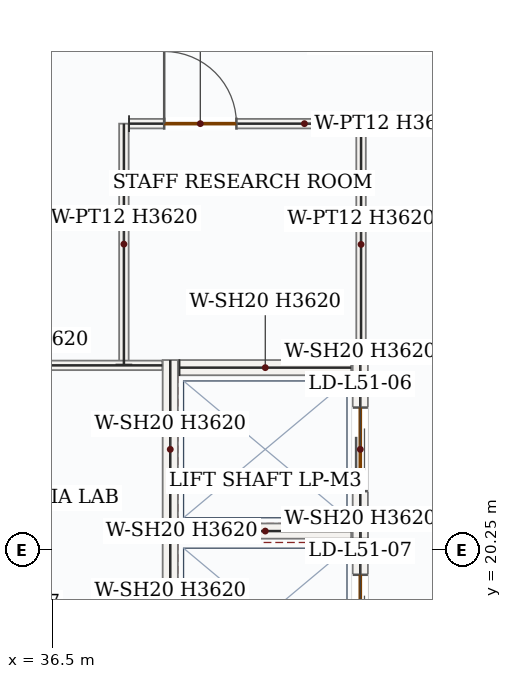
"""IFC4 building model, lengths in metres.
Left out: names, types, materials, properties, quantities, classifications, styles, units other than length and angle.
Written with IfcOpenShell. Run it as: python <this file> out.ifc"""

import sys

from ifc_helpers import new_model, si_unit, direction, frame, frame_2d, origin, place, context, subcontext, project, spatial, rectangle, extrude, source, transform, mapped, element, fill, save


model = new_model("IFC4")
c1 = context("Model", 3, precision=1e-05, world=origin(), true_north=direction((0.0, 1.0)))
c2 = subcontext(c1, "Body", "Model", "MODEL_VIEW")
j1 = project(units=[si_unit("LENGTHUNIT", "METRE"), si_unit("PLANEANGLEUNIT", "RADIAN")], contexts=[c1])
p1 = place(None, origin())
s1 = spatial("IfcSite", under=j1, at=p1, CompositionType="ELEMENT")
p2 = place(p1, origin())
s2 = spatial("IfcBuilding", under=s1, at=p2, CompositionType="ELEMENT")
p3 = place(p2, frame((0.0, 0.0, 217.5)))
s3 = spatial("IfcBuildingStorey", under=s2, at=p3, CompositionType="ELEMENT", Elevation=217.5)
m1 = source(origin(), c2, "Body", "SweptSolid", [
    extrude(rectangle(XDim=2.35, YDim=0.2, at=frame_2d((1.175, 0.0))), origin(), (0.0, 0.0, 1.0), 3.62),
])
p4 = place(p3, frame((38.05, 20.4, 0.0), z_axis=(0.0, 0.0, 1.0), x_axis=(0.0, 1.0, 0.0)))
e1 = element("IfcWall", 1, at=p4, inside=s3, PredefinedType="SOLIDWALL", context=c2, shape_type="MappedRepresentation", body=[
    mapped(m1, transform((0.0, 0.0, 0.0), x_axis=(1.0, 0.0, 0.0), y_axis=(0.0, 1.0, 0.0), z_axis=(0.0, 0.0, 1.0), scale=1.0)),
])
p5 = place(p3, frame((40.55, 20.4, 0.0), z_axis=(0.0, 0.0, 1.0), x_axis=(0.0, 1.0, 0.0)))
e2 = element("IfcWall", 2, at=p5, inside=s3, PredefinedType="SOLIDWALL", context=c2, shape_type="SweptSolid", body=[
    extrude(rectangle(XDim=2.35, YDim=0.2, at=frame_2d((1.175, 0.0))), origin(), (0.0, 0.0, 1.0), 3.62),
])
p6 = place(p5, frame((0.625, 0.0, 0.0)))
e3 = element("IfcOpeningElement", 3, at=p6, cuts=e2, PredefinedType="OPENING", context=c2, shape_type="SweptSolid", body=[
    extrude(rectangle(XDim=1.1, YDim=2.15, at=frame_2d((0.55, 1.075))), frame((0.0, 0.11, 0.0), z_axis=(0.0, -1.0, 0.0), x_axis=(1.0, 0.0, 0.0)), (0.0, 0.0, 1.0), 0.22),
])
m2 = source(origin(), c2, "Body", "SweptSolid", [
    extrude(rectangle(XDim=2.26, YDim=0.2, at=frame_2d((1.13, 0.0))), origin(), (0.0, 0.0, 1.0), 3.62),
])
for number, where, z_axis, x_axis in (
    (4, (38.17, 20.5, 0.0), (0.0, 0.0, 1.0), (1.0, 0.0, 0.0)),
    (5, (38.17, 22.65, 0.0), (0.0, 0.0, 1.0), (1.0, 0.0, 0.0)),
):
    element("IfcWall", number, at=place(p3, frame(where, z_axis=z_axis, x_axis=x_axis)), inside=s3, PredefinedType="SOLIDWALL", context=c2, shape_type="MappedRepresentation", body=[
        mapped(m2, transform((0.0, 0.0, 0.0), x_axis=(1.0, 0.0, 0.0), y_axis=(0.0, 1.0, 0.0), z_axis=(0.0, 0.0, 1.0), scale=1.0)),
    ])
p7 = place(p3, frame((38.05, 18.2, 0.0), z_axis=(0.0, 0.0, 1.0), x_axis=(0.0, 1.0, 0.0)))
e6 = element("IfcWall", 6, at=p7, inside=s3, PredefinedType="SOLIDWALL", context=c2, shape_type="MappedRepresentation", body=[
    mapped(m1, transform((0.0, 0.0, 0.0), x_axis=(1.0, 0.0, 0.0), y_axis=(0.0, 1.0, 0.0), z_axis=(0.0, 0.0, 1.0), scale=1.0)),
])
p8 = place(p3, frame((40.55, 18.2, 0.0), z_axis=(0.0, 0.0, 1.0), x_axis=(0.0, 1.0, 0.0)))
e7 = element("IfcWall", 7, at=p8, inside=s3, PredefinedType="SOLIDWALL", context=c2, shape_type="SweptSolid", body=[
    extrude(rectangle(XDim=2.35, YDim=0.2, at=frame_2d((1.175, 0.0))), origin(), (0.0, 0.0, 1.0), 3.62),
])
p9 = place(p8, frame((0.625, 0.0, 0.0)))
e8 = element("IfcOpeningElement", 8, at=p9, cuts=e7, PredefinedType="OPENING", context=c2, shape_type="SweptSolid", body=[
    extrude(rectangle(XDim=1.1, YDim=2.15, at=frame_2d((0.55, 1.075))), frame((0.0, 0.11, 0.0), z_axis=(0.0, -1.0, 0.0), x_axis=(1.0, 0.0, 0.0)), (0.0, 0.0, 1.0), 0.22),
])
m3 = source(origin(), c2, "Body", "SweptSolid", [
    extrude(rectangle(XDim=3.17, YDim=0.125, at=frame_2d((1.585, 0.0))), origin(), (0.0, 0.0, 1.0), 3.62),
])
p10 = place(p3, frame((37.44, 22.69, 0.0), z_axis=(0.0, 0.0, 1.0), x_axis=(0.0, 1.0, 0.0)))
e9 = element("IfcWall", 9, at=p10, inside=s3, PredefinedType="PARTITIONING", context=c2, shape_type="MappedRepresentation", body=[
    mapped(m3, transform((0.0, 0.0, 0.0), x_axis=(1.0, 0.0, 0.0), y_axis=(0.0, 1.0, 0.0), z_axis=(0.0, 0.0, 1.0), scale=1.0)),
])
p11 = place(p3, frame((37.508, 25.86, 0.0), z_axis=(0.0, 0.0, 1.0), x_axis=(1.0, 0.0, 0.0)))
e10 = element("IfcWall", 10, at=p11, inside=s3, PredefinedType="PARTITIONING", context=c2, shape_type="SweptSolid", body=[
    extrude(rectangle(XDim=3.052, YDim=0.125, at=frame_2d((1.526, 0.0))), origin(), (0.0, 0.0, 1.0), 3.62),
])
p12 = place(p11, frame((0.463, 0.0, 0.0)))
e11 = element("IfcOpeningElement", 11, at=p12, cuts=e10, PredefinedType="OPENING", context=c2, shape_type="SweptSolid", body=[
    extrude(rectangle(XDim=0.95, YDim=2.15, at=frame_2d((0.475, 1.075))), frame((0.0, 0.073, 0.0), z_axis=(0.0, -1.0, 0.0), x_axis=(1.0, 0.0, 0.0)), (0.0, 0.0, 1.0), 0.145),
])
m4 = source(origin(), c2, "Body", "SweptSolid", [
    extrude(rectangle(XDim=3.042, YDim=0.125, at=frame_2d((1.521, 0.0))), origin(), (0.0, 0.0, 1.0), 3.62),
])
p13 = place(p3, frame((40.56, 25.792, 0.0), z_axis=(0.0, 0.0, 1.0), x_axis=(0.0, -1.0, 0.0)))
e12 = element("IfcWall", 12, at=p13, inside=s3, PredefinedType="PARTITIONING", context=c2, shape_type="MappedRepresentation", body=[
    mapped(m4, transform((0.0, 0.0, 0.0), x_axis=(1.0, 0.0, 0.0), y_axis=(0.0, 1.0, 0.0), z_axis=(0.0, 0.0, 1.0), scale=1.0)),
])
m5 = source(origin(), c2, "Body", "SweptSolid", [
    extrude(rectangle(XDim=3.89, YDim=0.125, at=frame_2d((1.945, 0.0))), origin(), (0.0, 0.0, 1.0), 3.62),
])
p14 = place(p3, frame((34.055, 22.68, 0.0), z_axis=(0.0, 0.0, 1.0), x_axis=(1.0, 0.0, 0.0)))
e13 = element("IfcWall", 13, at=p14, inside=s3, PredefinedType="PARTITIONING", context=c2, shape_type="MappedRepresentation", body=[
    mapped(m5, transform((0.0, 0.0, 0.0), x_axis=(1.0, 0.0, 0.0), y_axis=(0.0, 1.0, 0.0), z_axis=(0.0, 0.0, 1.0), scale=1.0)),
])
m6 = source(origin(), c2, "Body", "SweptSolid", [
    extrude(rectangle(XDim=1.1, YDim=2.15, at=frame_2d((0.55, 1.075))), frame((0.0, 0.025, 0.0), z_axis=(0.0, -1.0, 0.0), x_axis=(1.0, 0.0, 0.0)), (0.0, 0.0, 1.0), 0.05),
])
p15 = place(p6, origin())
e14 = element("IfcDoor", 14, at=p15, inside=s3, OperationType="DOUBLE_DOOR_SLIDING", PredefinedType="DOOR", context=c2, shape_type="MappedRepresentation", body=[
    mapped(m6, transform((0.0, 0.0, 0.0), x_axis=(1.0, 0.0, 0.0), y_axis=(0.0, 1.0, 0.0), z_axis=(0.0, 0.0, 1.0), scale=1.0)),
])
fill(e3, e14)
p16 = place(p9, origin())
e15 = element("IfcDoor", 15, at=p16, inside=s3, OperationType="DOUBLE_DOOR_SLIDING", PredefinedType="DOOR", context=c2, shape_type="MappedRepresentation", body=[
    mapped(m6, transform((0.0, 0.0, 0.0), x_axis=(1.0, 0.0, 0.0), y_axis=(0.0, 1.0, 0.0), z_axis=(0.0, 0.0, 1.0), scale=1.0)),
])
fill(e8, e15)
m7 = source(origin(), c2, "Body", "SweptSolid", [
    extrude(rectangle(XDim=0.95, YDim=2.15, at=frame_2d((0.475, 1.075))), frame((0.0, 0.025, 0.0), z_axis=(0.0, -1.0, 0.0), x_axis=(1.0, 0.0, 0.0)), (0.0, 0.0, 1.0), 0.05),
])
p17 = place(p12, origin())
e16 = element("IfcDoor", 16, at=p17, inside=s3, OperationType="SINGLE_SWING_LEFT", PredefinedType="DOOR", context=c2, shape_type="MappedRepresentation", body=[
    mapped(m7, transform((0.0, 0.0, 0.0), x_axis=(1.0, 0.0, 0.0), y_axis=(0.0, 1.0, 0.0), z_axis=(0.0, 0.0, 1.0), scale=1.0)),
])
fill(e11, e16)
save(model, sys.argv[1])
